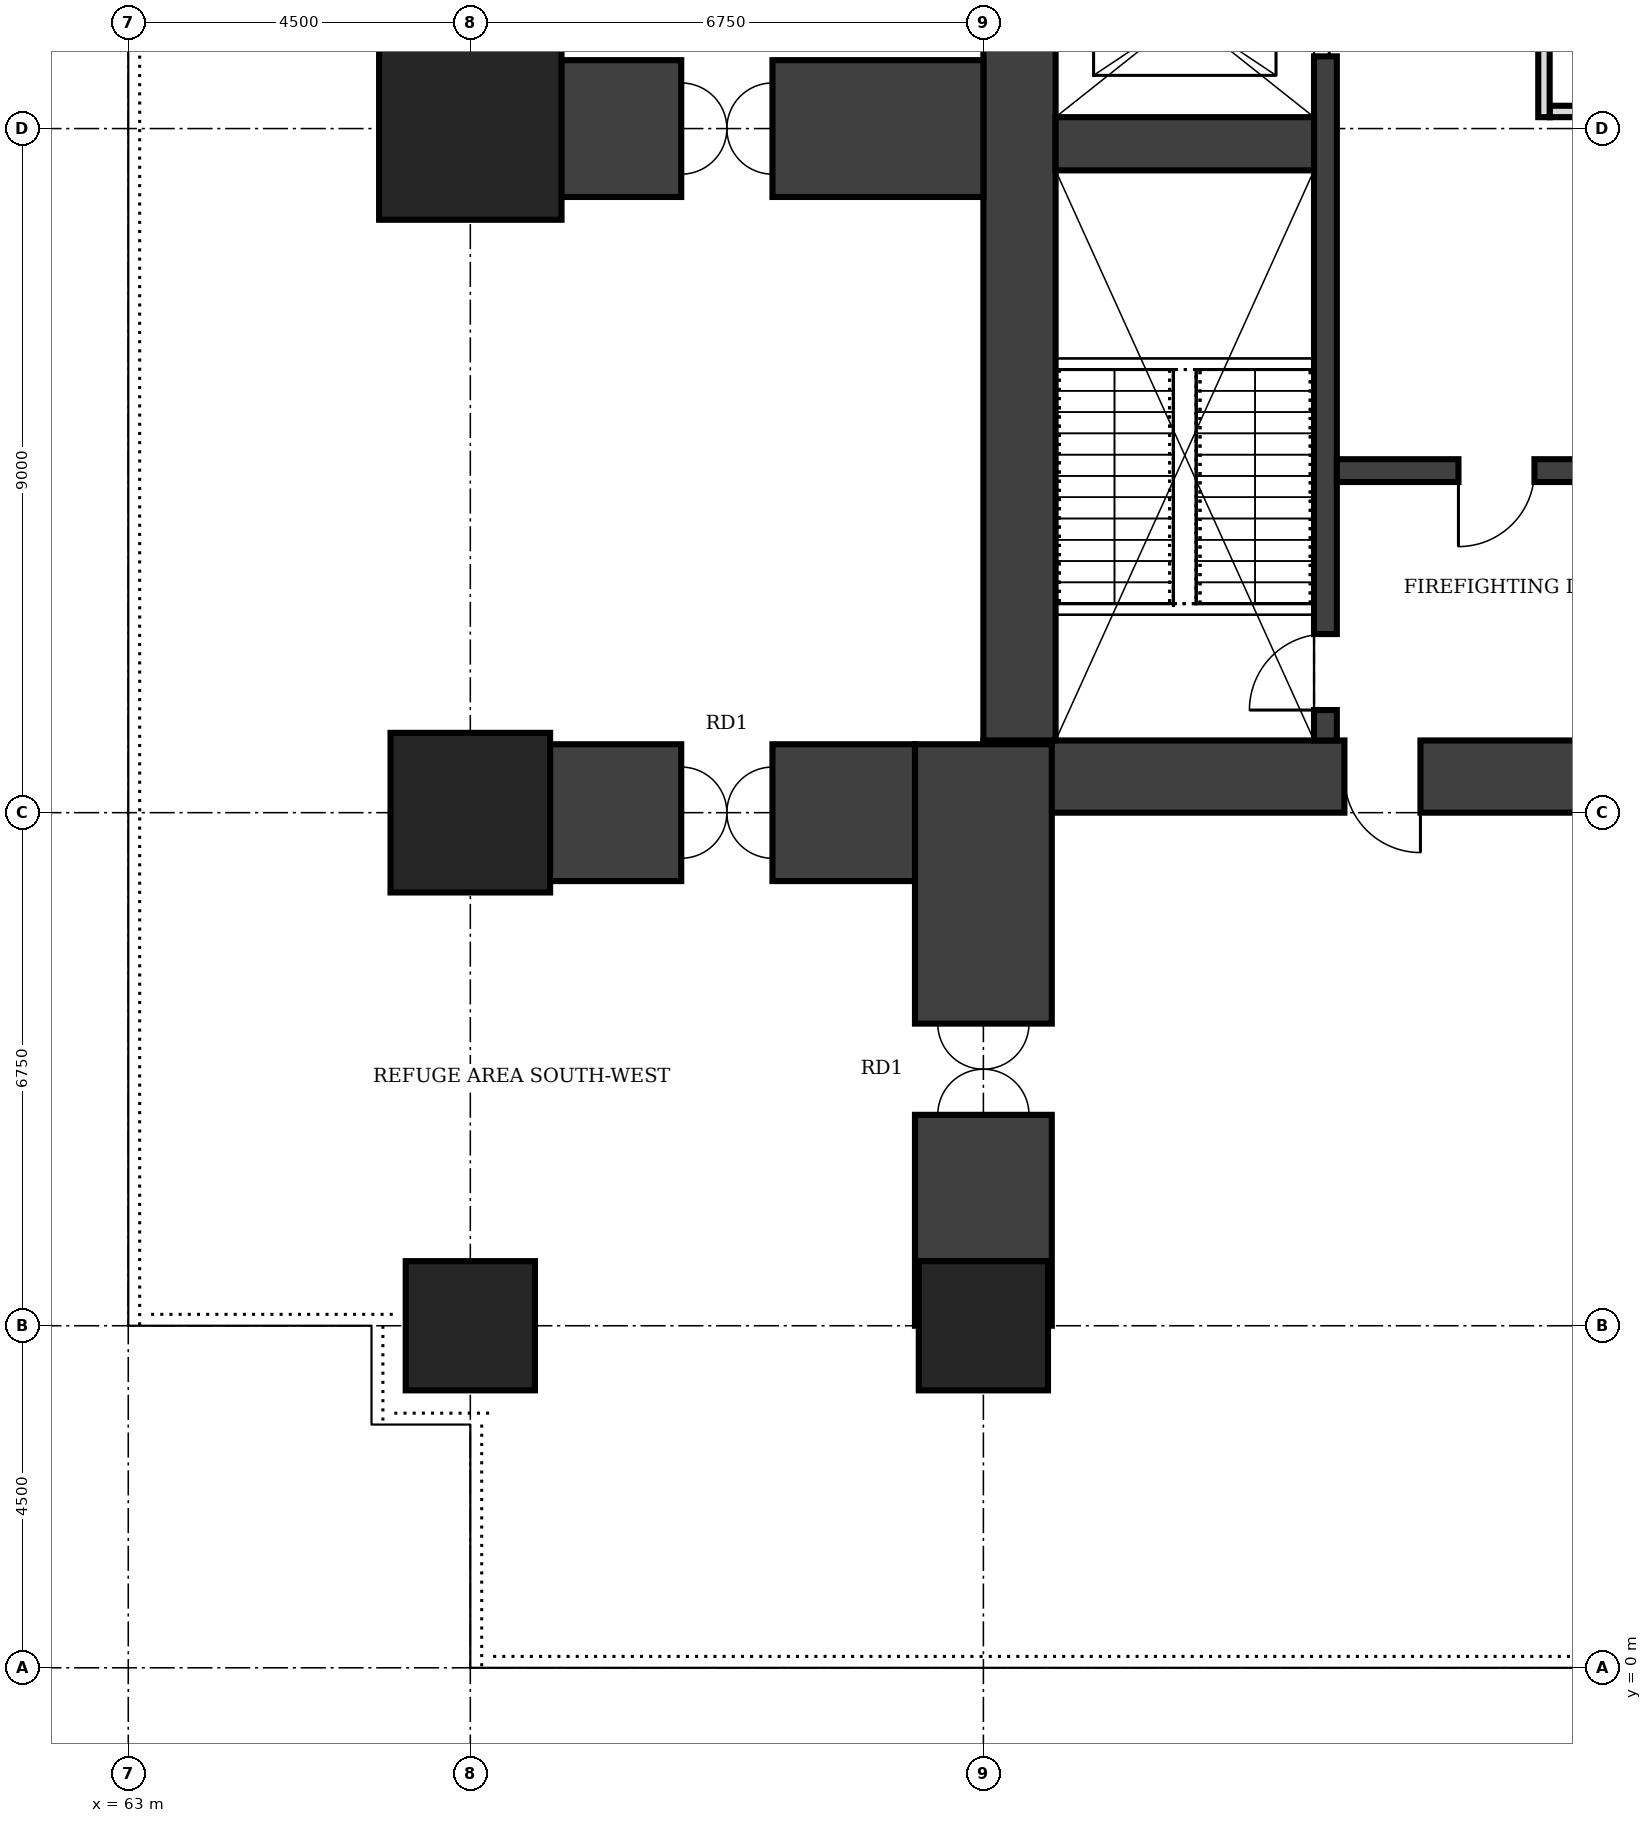
"""IFC4 building model, lengths in metres.
Left out: names, types, materials, properties, quantities, classifications, styles, units other than length and angle.
Written with IfcOpenShell. Run it as: python <this file> out.ifc"""

import sys

from ifc_helpers import new_model, si_unit, direction, frame, frame_2d, origin, origin_2d, place, context, subcontext, project, spatial, rectangle, extrude, element, fill, save


model = new_model("IFC4")
c1 = context("Model", 3, precision=1e-05, world=origin(), true_north=direction((0.0, 1.0)))
c2 = subcontext(c1, "Body", "Model", "MODEL_VIEW")
j1 = project(units=[si_unit("LENGTHUNIT", "METRE"), si_unit("PLANEANGLEUNIT", "RADIAN")], contexts=[c1])
p1 = place(None, origin())
s1 = spatial("IfcSite", under=j1, at=p1, CompositionType="ELEMENT")
p2 = place(p1, origin())
s2 = spatial("IfcBuilding", under=s1, at=p2, CompositionType="ELEMENT")
p3 = place(p2, frame((0.0, 0.0, 77.0)))
s3 = spatial("IfcBuildingStorey", under=s2, at=p3, CompositionType="ELEMENT", Elevation=77.0)
p4 = place(p3, frame((74.25, 11.725, 0.0), z_axis=(0.0, 0.0, 1.0), x_axis=(1.0, 0.0, 0.0)))
e1 = element("IfcWall", 1, at=p4, inside=s3, PredefinedType="SHEAR", context=c2, shape_type="SweptSolid", body=[
    extrude(rectangle(XDim=13.5, YDim=0.95, at=frame_2d((6.75, 0.0))), origin(), (0.0, 0.0, 1.0), 8.0),
])
p5 = place(p4, frame((4.75, 0.0, 0.0)))
e2 = element("IfcOpeningElement", 2, at=p5, cuts=e1, PredefinedType="OPENING", context=c2, shape_type="SweptSolid", body=[
    extrude(rectangle(XDim=1.0, YDim=2.1, at=frame_2d((0.5, 1.05))), frame((0.0, 0.485, 0.0), z_axis=(0.0, -1.0, 0.0), x_axis=(1.0, 0.0, 0.0)), (0.0, 0.0, 1.0), 0.97),
])
p6 = place(p3, frame((74.725, 28.3, 0.0), z_axis=(0.0, 0.0, 1.0), x_axis=(0.0, -1.0, 0.0)))
e3 = element("IfcWall", 3, at=p6, inside=s3, PredefinedType="SHEAR", context=c2, shape_type="SweptSolid", body=[
    extrude(rectangle(XDim=16.1, YDim=0.95, at=frame_2d((8.05, 0.0))), origin(), (0.0, 0.0, 1.0), 8.0),
])
p7 = place(p3, frame((78.75, 12.2, 0.0), z_axis=(0.0, 0.0, 1.0), x_axis=(0.0, 1.0, 0.0)))
e4 = element("IfcWall", 4, at=p7, inside=s3, PredefinedType="SHEAR", context=c2, shape_type="SweptSolid", body=[
    extrude(rectangle(XDim=16.1, YDim=0.3, at=frame_2d((8.05, 0.0))), origin(), (0.0, 0.0, 1.0), 8.0),
])
p8 = place(p7, frame((0.4, 0.0, 0.0)))
e5 = element("IfcOpeningElement", 5, at=p8, cuts=e4, PredefinedType="OPENING", context=c2, shape_type="SweptSolid", body=[
    extrude(rectangle(XDim=1.0, YDim=2.1, at=frame_2d((0.5, 1.05))), frame((0.0, 0.16, 0.0), z_axis=(0.0, -1.0, 0.0), x_axis=(1.0, 0.0, 0.0)), (0.0, 0.0, 1.0), 0.32),
])
p9 = place(p7, frame((9.0, 0.0, 0.0)))
e6 = element("IfcOpeningElement", 6, at=p9, cuts=e4, PredefinedType="OPENING", context=c2, shape_type="SweptSolid", body=[
    extrude(rectangle(XDim=1.1, YDim=2.1, at=frame_2d((0.55, 1.05))), frame((0.0, 0.16, 0.0), z_axis=(0.0, -1.0, 0.0), x_axis=(1.0, 0.0, 0.0)), (0.0, 0.0, 1.0), 0.32),
])
p10 = place(p7, frame((12.0, 0.0, 0.0)))
e7 = element("IfcOpeningElement", 7, at=p10, cuts=e4, PredefinedType="OPENING", context=c2, shape_type="SweptSolid", body=[
    extrude(rectangle(XDim=1.1, YDim=2.1, at=frame_2d((0.55, 1.05))), frame((0.0, 0.16, 0.0), z_axis=(0.0, -1.0, 0.0), x_axis=(1.0, 0.0, 0.0)), (0.0, 0.0, 1.0), 0.32),
])
p11 = place(p3, frame((75.2, 20.05, 0.0), z_axis=(0.0, 0.0, 1.0), x_axis=(1.0, 0.0, 0.0)))
e8 = element("IfcWall", 8, at=p11, inside=s3, PredefinedType="SHEAR", context=c2, shape_type="SweptSolid", body=[
    extrude(rectangle(XDim=3.4, YDim=0.7, at=frame_2d((1.7, 0.0))), origin(), (0.0, 0.0, 1.0), 8.0),
])
p12 = place(p3, frame((78.9, 15.75, 0.0), z_axis=(0.0, 0.0, 1.0), x_axis=(1.0, 0.0, 0.0)))
e9 = element("IfcWall", 9, at=p12, inside=s3, PredefinedType="SHEAR", context=c2, shape_type="SweptSolid", body=[
    extrude(rectangle(XDim=4.2, YDim=0.3, at=frame_2d((2.1, 0.0))), origin(), (0.0, 0.0, 1.0), 8.0),
])
p13 = place(p12, frame((1.6, 0.0, 0.0)))
e10 = element("IfcOpeningElement", 10, at=p13, cuts=e9, PredefinedType="OPENING", context=c2, shape_type="SweptSolid", body=[
    extrude(rectangle(XDim=1.0, YDim=2.1, at=frame_2d((0.5, 1.05))), frame((0.0, 0.16, 0.0), z_axis=(0.0, -1.0, 0.0), x_axis=(1.0, 0.0, 0.0)), (0.0, 0.0, 1.0), 0.32),
])
for number, where, z_axis, x_axis in (
    (11, (67.5, 4.5, 0.0), (0.0, 0.0, 1.0), (1.0, 0.0, 0.0)),
    (12, (74.25, 4.5, 0.0), (0.0, 0.0, 1.0), (1.0, 0.0, 0.0)),
):
    element("IfcColumn", number, at=place(p3, frame(where, z_axis=z_axis, x_axis=x_axis)), inside=s3, PredefinedType="COLUMN", context=c2, shape_type="SweptSolid", body=[
        extrude(rectangle(XDim=1.7, YDim=1.7, at=origin_2d()), origin(), (0.0, 0.0, 1.0), 8.0),
    ])
p14 = place(p3, frame((67.5, 11.25, 0.0), z_axis=(0.0, 0.0, 1.0), x_axis=(1.0, 0.0, 0.0)))
e13 = element("IfcColumn", 13, at=p14, inside=s3, PredefinedType="COLUMN", context=c2, shape_type="SweptSolid", body=[
    extrude(rectangle(XDim=2.1, YDim=2.1, at=origin_2d()), origin(), (0.0, 0.0, 1.0), 8.0),
])
p15 = place(p3, frame((67.5, 20.25, 0.0), z_axis=(0.0, 0.0, 1.0), x_axis=(1.0, 0.0, 0.0)))
e14 = element("IfcColumn", 14, at=p15, inside=s3, PredefinedType="COLUMN", context=c2, shape_type="SweptSolid", body=[
    extrude(rectangle(XDim=2.4, YDim=2.4, at=origin_2d()), origin(), (0.0, 0.0, 1.0), 8.0),
])
p16 = place(p3, frame((74.25, 4.5, 0.0), z_axis=(0.0, 0.0, 1.0), x_axis=(0.0, 1.0, 0.0)))
e15 = element("IfcWall", 15, at=p16, inside=s3, PredefinedType="SHEAR", context=c2, shape_type="SweptSolid", body=[
    extrude(rectangle(XDim=7.65, YDim=1.8, at=frame_2d((3.825, 0.0))), origin(), (0.0, 0.0, 1.0), 8.0),
])
p17 = place(p16, frame((2.775, 0.0, 0.0)))
e16 = element("IfcOpeningElement", 16, at=p17, cuts=e15, PredefinedType="OPENING", context=c2, shape_type="SweptSolid", body=[
    extrude(rectangle(XDim=1.2, YDim=2.1, at=frame_2d((0.6, 1.05))), frame((0.0, 0.91, 0.0), z_axis=(0.0, -1.0, 0.0), x_axis=(1.0, 0.0, 0.0)), (0.0, 0.0, 1.0), 1.82),
])
p18 = place(p3, frame((67.5, 20.25, 0.0), z_axis=(0.0, 0.0, 1.0), x_axis=(1.0, 0.0, 0.0)))
e17 = element("IfcWall", 17, at=p18, inside=s3, PredefinedType="SHEAR", context=c2, shape_type="SweptSolid", body=[
    extrude(rectangle(XDim=6.75, YDim=1.8, at=frame_2d((3.375, 0.0))), origin(), (0.0, 0.0, 1.0), 8.0),
])
p19 = place(p18, frame((2.775, 0.0, 0.0)))
e18 = element("IfcOpeningElement", 18, at=p19, cuts=e17, PredefinedType="OPENING", context=c2, shape_type="SweptSolid", body=[
    extrude(rectangle(XDim=1.2, YDim=2.1, at=frame_2d((0.6, 1.05))), frame((0.0, 0.91, 0.0), z_axis=(0.0, -1.0, 0.0), x_axis=(1.0, 0.0, 0.0)), (0.0, 0.0, 1.0), 1.82),
])
p20 = place(p3, frame((67.5, 11.25, 0.0), z_axis=(0.0, 0.0, 1.0), x_axis=(1.0, 0.0, 0.0)))
e19 = element("IfcWall", 19, at=p20, inside=s3, PredefinedType="SHEAR", context=c2, shape_type="SweptSolid", body=[
    extrude(rectangle(XDim=5.85, YDim=1.8, at=frame_2d((2.925, 0.0))), origin(), (0.0, 0.0, 1.0), 8.0),
])
p21 = place(p20, frame((2.775, 0.0, 0.0)))
e20 = element("IfcOpeningElement", 20, at=p21, cuts=e19, PredefinedType="OPENING", context=c2, shape_type="SweptSolid", body=[
    extrude(rectangle(XDim=1.2, YDim=2.1, at=frame_2d((0.6, 1.05))), frame((0.0, 0.91, 0.0), z_axis=(0.0, -1.0, 0.0), x_axis=(1.0, 0.0, 0.0)), (0.0, 0.0, 1.0), 1.82),
])
p22 = place(p3, frame((81.625, 20.4, 0.0), z_axis=(0.0, 0.0, 1.0), x_axis=(0.0, 1.0, 0.0)))
e21 = element("IfcWall", 21, at=p22, inside=s3, PredefinedType="PARTITIONING", context=c2, shape_type="SweptSolid", body=[
    extrude(rectangle(XDim=6.0, YDim=0.15, at=frame_2d((3.0, 0.0))), origin(), (0.0, 0.0, 1.0), 7.75),
])
p23 = place(p22, frame((2.55, 0.0, 0.0)))
e22 = element("IfcOpeningElement", 22, at=p23, cuts=e21, PredefinedType="OPENING", context=c2, shape_type="SweptSolid", body=[
    extrude(rectangle(XDim=0.9, YDim=2.1, at=frame_2d((0.45, 1.05))), frame((0.0, 0.085, 0.0), z_axis=(0.0, -1.0, 0.0), x_axis=(1.0, 0.0, 0.0)), (0.0, 0.0, 1.0), 0.17),
])
p24 = place(p3, frame((81.7, 20.475, 0.0), z_axis=(0.0, 0.0, 1.0), x_axis=(1.0, 0.0, 0.0)))
e23 = element("IfcWall", 23, at=p24, inside=s3, PredefinedType="PARTITIONING", context=c2, shape_type="SweptSolid", body=[
    extrude(rectangle(XDim=1.4, YDim=0.15, at=frame_2d((0.7, 0.0))), origin(), (0.0, 0.0, 1.0), 7.75),
])
p25 = place(p5, frame((1.0, 0.0, 0.0), z_axis=(0.0, 0.0, 1.0), x_axis=(-1.0, 0.0, 0.0)))
e24 = element("IfcDoor", 24, at=p25, inside=s3, OperationType="SINGLE_SWING_LEFT", PredefinedType="DOOR", context=c2, shape_type="SweptSolid", body=[
    extrude(rectangle(XDim=1.0, YDim=2.1, at=frame_2d((0.5, 1.05))), frame((0.0, 0.025, 0.0), z_axis=(0.0, -1.0, 0.0), x_axis=(1.0, 0.0, 0.0)), (0.0, 0.0, 1.0), 0.05),
])
fill(e2, e24)
p26 = place(p13, frame((1.0, 0.0, 0.0), z_axis=(0.0, 0.0, 1.0), x_axis=(-1.0, 0.0, 0.0)))
e25 = element("IfcDoor", 25, at=p26, inside=s3, OperationType="SINGLE_SWING_RIGHT", PredefinedType="DOOR", context=c2, shape_type="SweptSolid", body=[
    extrude(rectangle(XDim=1.0, YDim=2.1, at=frame_2d((0.5, 1.05))), frame((0.0, 0.025, 0.0), z_axis=(0.0, -1.0, 0.0), x_axis=(1.0, 0.0, 0.0)), (0.0, 0.0, 1.0), 0.05),
])
fill(e10, e25)
p27 = place(p8, origin())
e26 = element("IfcDoor", 26, at=p27, inside=s3, OperationType="SINGLE_SWING_LEFT", PredefinedType="DOOR", context=c2, shape_type="SweptSolid", body=[
    extrude(rectangle(XDim=1.0, YDim=2.1, at=frame_2d((0.5, 1.05))), frame((0.0, 0.025, 0.0), z_axis=(0.0, -1.0, 0.0), x_axis=(1.0, 0.0, 0.0)), (0.0, 0.0, 1.0), 0.05),
])
fill(e5, e26)
p28 = place(p9, origin())
e27 = element("IfcDoor", 27, at=p28, inside=s3, OperationType="DOUBLE_DOOR_SLIDING", PredefinedType="DOOR", context=c2, shape_type="SweptSolid", body=[
    extrude(rectangle(XDim=1.1, YDim=2.1, at=frame_2d((0.55, 1.05))), frame((0.0, 0.025, 0.0), z_axis=(0.0, -1.0, 0.0), x_axis=(1.0, 0.0, 0.0)), (0.0, 0.0, 1.0), 0.05),
])
fill(e6, e27)
p29 = place(p17, origin())
e28 = element("IfcDoor", 28, at=p29, inside=s3, OperationType="DOUBLE_DOOR_DOUBLE_SWING", PredefinedType="DOOR", context=c2, shape_type="SweptSolid", body=[
    extrude(rectangle(XDim=1.2, YDim=2.1, at=frame_2d((0.6, 1.05))), frame((0.0, 0.025, 0.0), z_axis=(0.0, -1.0, 0.0), x_axis=(1.0, 0.0, 0.0)), (0.0, 0.0, 1.0), 0.05),
])
fill(e16, e28)
p30 = place(p19, origin())
e29 = element("IfcDoor", 29, at=p30, inside=s3, OperationType="DOUBLE_DOOR_DOUBLE_SWING", PredefinedType="DOOR", context=c2, shape_type="SweptSolid", body=[
    extrude(rectangle(XDim=1.2, YDim=2.1, at=frame_2d((0.6, 1.05))), frame((0.0, 0.025, 0.0), z_axis=(0.0, -1.0, 0.0), x_axis=(1.0, 0.0, 0.0)), (0.0, 0.0, 1.0), 0.05),
])
fill(e18, e29)
p31 = place(p21, origin())
e30 = element("IfcDoor", 30, at=p31, inside=s3, OperationType="DOUBLE_DOOR_DOUBLE_SWING", PredefinedType="DOOR", context=c2, shape_type="SweptSolid", body=[
    extrude(rectangle(XDim=1.2, YDim=2.1, at=frame_2d((0.6, 1.05))), frame((0.0, 0.025, 0.0), z_axis=(0.0, -1.0, 0.0), x_axis=(1.0, 0.0, 0.0)), (0.0, 0.0, 1.0), 0.05),
])
fill(e20, e30)
save(model, sys.argv[1])
